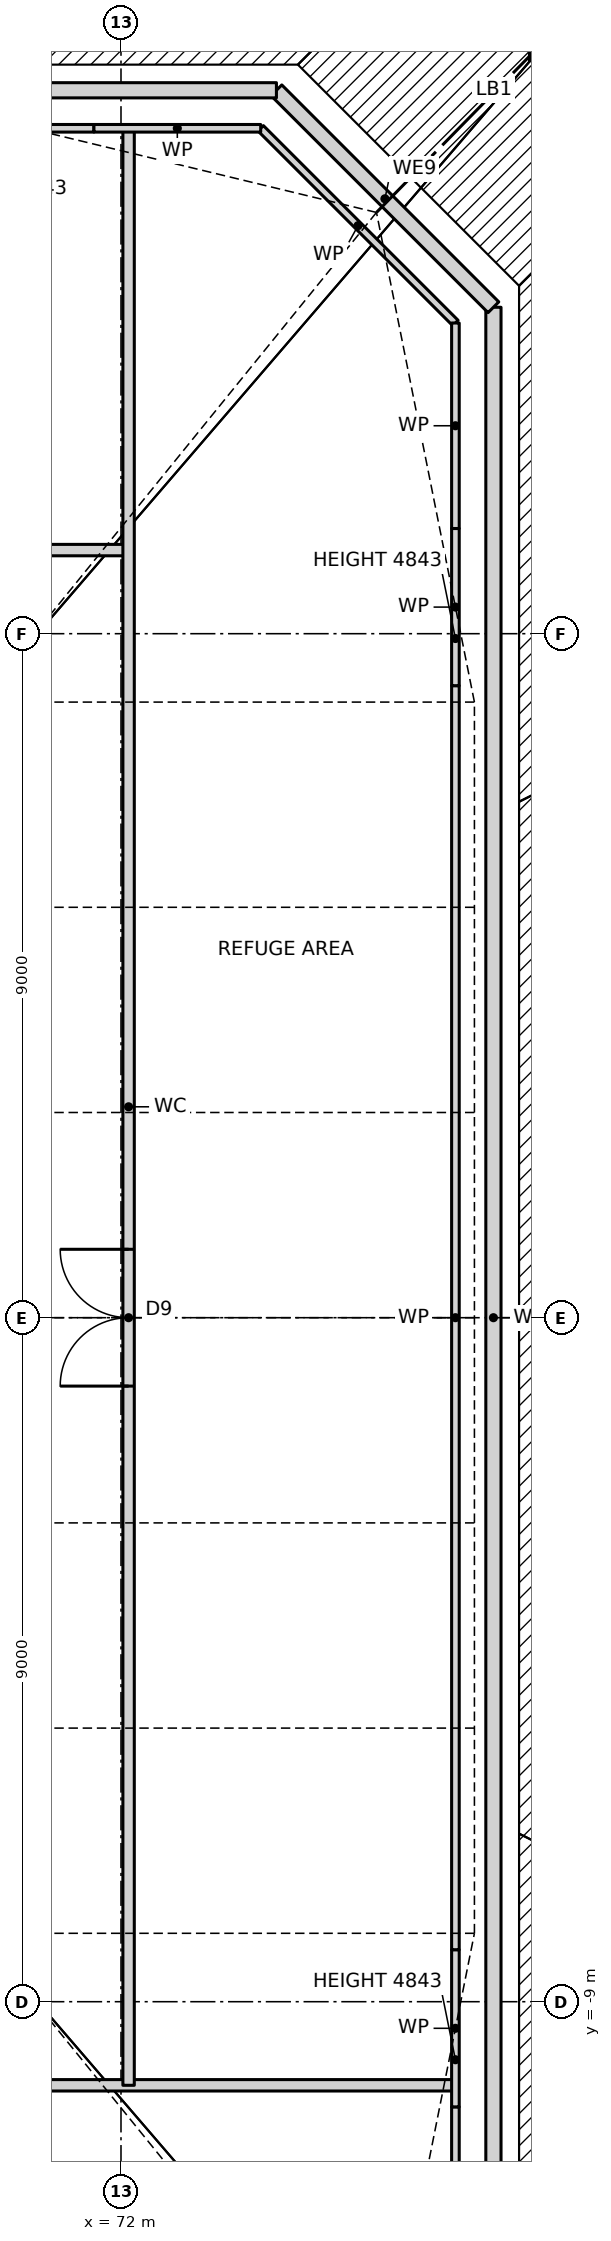
"""IFC4 building model, lengths in metres.
Left out: names, types, materials, properties, quantities, classifications, styles, units other than length and angle.
Written with IfcOpenShell. Run it as: python <this file> out.ifc"""

import sys

from ifc_helpers import new_model, si_unit, direction, frame, frame_2d, origin, origin_2d, place, context, subcontext, project, spatial, rectangle, i_section, extrude, clip, halfspace, element, fill, save


model = new_model("IFC4")
c1 = context("Model", 3, precision=1e-05, world=origin(), true_north=direction((0.0, 1.0)))
c2 = subcontext(c1, "Body", "Model", "MODEL_VIEW")
j1 = project(units=[si_unit("LENGTHUNIT", "METRE"), si_unit("PLANEANGLEUNIT", "RADIAN")], contexts=[c1])
p1 = place(None, origin())
s1 = spatial("IfcSite", under=j1, at=p1, CompositionType="ELEMENT")
p2 = place(p1, origin())
s2 = spatial("IfcBuilding", under=s1, at=p2, CompositionType="ELEMENT")
p3 = place(p2, frame((0.0, 0.0, 74.5)))
s3 = spatial("IfcBuildingStorey", under=s2, at=p3, CompositionType="ELEMENT", Elevation=74.5)
p4 = place(p3, frame((78.9, -9.45, 0.0), z_axis=(-0.343583115532, 0.206127500627, 0.91622164142), x_axis=(-0.514454704863, -0.857517554715, 0.0)))
e1 = element("IfcColumn", 1, at=p4, inside=s3, PredefinedType="COLUMN", context=c2, shape_type="Clipping", body=[
    clip(clip(extrude(i_section(OverallWidth=0.424, OverallDepth=0.475, WebThickness=0.048, FlangeThickness=0.077, at=origin_2d()), origin(), (0.0, 0.0, 1.0), 6.549), halfspace(frame((0.0, 0.0, 0.0), z_axis=(0.0, -0.400671815572, -0.91622164142), x_axis=(-0.514454704863, 0.785676141527, -0.343583115532)), False)), halfspace(frame((0.0, 2.404, 5.497), z_axis=(0.0, 0.400671815572, 0.91622164142), x_axis=(-0.514454704863, 0.785676141527, -0.343583115532)), False)),
])
p5 = place(p3, frame((78.9, -3.15, 0.0), z_axis=(-0.350261033367, 0.070044605522, 0.934029422311), x_axis=(-0.196095673508, -0.980584767795, 0.0)))
e2 = element("IfcColumn", 2, at=p5, inside=s3, PredefinedType="COLUMN", context=c2, shape_type="Clipping", body=[
    clip(clip(extrude(i_section(OverallWidth=0.424, OverallDepth=0.475, WebThickness=0.048, FlangeThickness=0.077, at=origin_2d()), origin(), (0.0, 0.0, 1.0), 6.424), halfspace(frame((0.0, 0.0, 0.0), z_axis=(0.0, -0.357196078167, -0.934029422311), x_axis=(-0.196095673508, 0.91589502419, -0.350261033367)), False)), halfspace(frame((0.0, 2.143, 5.604), z_axis=(0.0, 0.357196078167, 0.934029422311), x_axis=(-0.196095673508, 0.91589502419, -0.350261033367)), False)),
])
p6 = place(p3, frame((78.9, 3.15, 0.0), z_axis=(-0.350261033367, -0.070044605522, 0.934029422311), x_axis=(0.196095673508, -0.980584767795, 0.0)))
e3 = element("IfcColumn", 3, at=p6, inside=s3, PredefinedType="COLUMN", context=c2, shape_type="Clipping", body=[
    clip(clip(extrude(i_section(OverallWidth=0.424, OverallDepth=0.475, WebThickness=0.048, FlangeThickness=0.077, at=origin_2d()), origin(), (0.0, 0.0, 1.0), 6.424), halfspace(frame((0.0, 0.0, 0.0), z_axis=(0.0, -0.357196078167, -0.934029422311), x_axis=(0.196095673508, 0.91589502419, -0.350261033367)), False)), halfspace(frame((0.0, 2.143, 5.604), z_axis=(0.0, 0.357196078167, 0.934029422311), x_axis=(0.196095673508, 0.91589502419, -0.350261033367)), False)),
])
p7 = place(p3, frame((78.9, 9.45, 0.0), z_axis=(-0.343583115532, -0.206127500627, 0.91622164142), x_axis=(0.514454704863, -0.857517554715, 0.0)))
e4 = element("IfcColumn", 4, at=p7, inside=s3, PredefinedType="COLUMN", context=c2, shape_type="Clipping", body=[
    clip(clip(extrude(i_section(OverallWidth=0.424, OverallDepth=0.475, WebThickness=0.048, FlangeThickness=0.077, at=origin_2d()), origin(), (0.0, 0.0, 1.0), 6.549), halfspace(frame((0.0, 0.0, 0.0), z_axis=(0.0, -0.400671815572, -0.91622164142), x_axis=(0.514454704863, 0.785676141527, -0.343583115532)), False)), halfspace(frame((0.0, 2.404, 5.497), z_axis=(0.0, 0.400671815572, 0.91622164142), x_axis=(0.514454704863, 0.785676141527, -0.343583115532)), False)),
])
p8 = place(p3, frame((77.606, 16.797, 0.0), z_axis=(-0.330551321937, -0.331953334069, 0.883483337458), x_axis=(0.708601594959, -0.705608800698, 0.0)))
e5 = element("IfcColumn", 5, at=p8, inside=s3, PredefinedType="COLUMN", context=c2, shape_type="Clipping", body=[
    clip(clip(extrude(i_section(OverallWidth=0.424, OverallDepth=0.475, WebThickness=0.048, FlangeThickness=0.077, at=origin_2d()), origin(), (0.0, 0.0, 1.0), 6.791), halfspace(frame((0.0, 0.0, 0.0), z_axis=(0.0, -0.468462583814, -0.883483337458), x_axis=(0.708601594959, 0.62339361818, -0.330551321937)), False)), halfspace(frame((0.0, 2.811, 5.301), z_axis=(0.0, 0.468462583814, 0.883483337458), x_axis=(0.708601594959, 0.62339361818, -0.330551321937)), False)),
])
p9 = place(p3, frame((71.1, 18.15, 0.0), z_axis=(-0.206163197348, -0.343580475001, 0.916214600002), x_axis=(0.857476506072, -0.514523120505, 0.0)))
e6 = element("IfcColumn", 6, at=p9, inside=s3, PredefinedType="COLUMN", context=c2, shape_type="Clipping", body=[
    clip(clip(extrude(i_section(OverallWidth=0.424, OverallDepth=0.475, WebThickness=0.048, FlangeThickness=0.077, at=origin_2d()), origin(), (0.0, 0.0, 1.0), 6.549), halfspace(frame((0.0, 0.0, 0.0), z_axis=(0.0, -0.400687916891, -0.916214600002), x_axis=(0.857476506072, 0.471413595046, -0.206163197348)), False)), halfspace(frame((0.0, 2.404, 5.497), z_axis=(0.0, 0.400687916891, 0.916214600002), x_axis=(0.857476506072, 0.471413595046, -0.206163197348)), False)),
])
p10 = place(p3, frame((76.9, -13.295, 0.0), z_axis=(0.0, 0.0, 1.0), x_axis=(0.0, 1.0, 0.0)))
e7 = element("IfcWall", 7, at=p10, inside=s3, PredefinedType="PARTITIONING", context=c2, shape_type="SweptSolid", body=[
    extrude(rectangle(XDim=26.59, YDim=0.2, at=frame_2d((13.295, 0.0))), origin(), (0.0, 0.0, 1.0), 5.7),
])
p11 = place(p3, frame((76.9, 13.295, 0.0), z_axis=(0.0, 0.0, 1.0), x_axis=(-0.707106781187, 0.707106781187, 0.0)))
e8 = element("IfcWall", 8, at=p11, inside=s3, PredefinedType="PARTITIONING", context=c2, shape_type="SweptSolid", body=[
    extrude(rectangle(XDim=4.038, YDim=0.2, at=frame_2d((2.019, 0.0))), origin(), (0.0, 0.0, 1.0), 5.7),
])
p12 = place(p3, frame((74.045, 16.15, 0.0), z_axis=(0.0, 0.0, 1.0), x_axis=(-1.0, 0.0, 0.0)))
e9 = element("IfcWall", 9, at=p12, inside=s3, PredefinedType="PARTITIONING", context=c2, shape_type="SweptSolid", body=[
    extrude(rectangle(XDim=22.09, YDim=0.2, at=frame_2d((11.045, 0.0))), origin(), (0.0, 0.0, 1.0), 5.7),
])
p13 = place(p3, frame((53.9, -10.1, 0.0), z_axis=(0.0, 0.0, 1.0), x_axis=(1.0, 0.0, 0.0)))
e10 = element("IfcWall", 10, at=p13, inside=s3, PredefinedType="PARTITIONING", context=c2, shape_type="SweptSolid", body=[
    extrude(rectangle(XDim=22.5, YDim=0.15, at=frame_2d((11.25, 0.0))), origin(), (0.0, 0.0, 1.0), 5.77),
])
p14 = place(p13, frame((3.6, 0.0, 0.0)))
e11 = element("IfcOpeningElement", 11, at=p14, cuts=e10, PredefinedType="OPENING", context=c2, shape_type="SweptSolid", body=[
    extrude(rectangle(XDim=1.8, YDim=2.1, at=frame_2d((0.9, 1.05))), frame((0.0, 0.085, 0.0), z_axis=(0.0, -1.0, 0.0), x_axis=(1.0, 0.0, 0.0)), (0.0, 0.0, 1.0), 0.17),
])
p15 = place(p13, frame((12.7, 0.0, 0.0)))
e12 = element("IfcOpeningElement", 12, at=p15, cuts=e10, PredefinedType="OPENING", context=c2, shape_type="SweptSolid", body=[
    extrude(rectangle(XDim=1.8, YDim=2.1, at=frame_2d((0.9, 1.05))), frame((0.0, 0.085, 0.0), z_axis=(0.0, -1.0, 0.0), x_axis=(1.0, 0.0, 0.0)), (0.0, 0.0, 1.0), 0.17),
])
p16 = place(p3, frame((49.6, 10.1, 0.0), z_axis=(0.0, 0.0, 1.0), x_axis=(1.0, 0.0, 0.0)))
e13 = element("IfcWall", 13, at=p16, inside=s3, PredefinedType="PARTITIONING", context=c2, shape_type="SweptSolid", body=[
    extrude(rectangle(XDim=22.5, YDim=0.15, at=frame_2d((11.25, 0.0))), origin(), (0.0, 0.0, 1.0), 5.77),
])
p17 = place(p16, frame((17.6, 0.0, 0.0)))
e14 = element("IfcOpeningElement", 14, at=p17, cuts=e13, PredefinedType="OPENING", context=c2, shape_type="SweptSolid", body=[
    extrude(rectangle(XDim=1.8, YDim=2.1, at=frame_2d((0.9, 1.05))), frame((0.0, 0.085, 0.0), z_axis=(0.0, -1.0, 0.0), x_axis=(1.0, 0.0, 0.0)), (0.0, 0.0, 1.0), 0.17),
])
p18 = place(p16, frame((8.5, 0.0, 0.0)))
e15 = element("IfcOpeningElement", 15, at=p18, cuts=e13, PredefinedType="OPENING", context=c2, shape_type="SweptSolid", body=[
    extrude(rectangle(XDim=1.8, YDim=2.1, at=frame_2d((0.9, 1.05))), frame((0.0, 0.085, 0.0), z_axis=(0.0, -1.0, 0.0), x_axis=(1.0, 0.0, 0.0)), (0.0, 0.0, 1.0), 0.17),
])
p19 = place(p3, frame((76.4, -13.088, 0.0), z_axis=(0.0, 0.0, 1.0), x_axis=(0.0, 1.0, 0.0)))
e16 = element("IfcWall", 16, at=p19, inside=s3, PredefinedType="PARTITIONING", context=c2, shape_type="SweptSolid", body=[
    extrude(rectangle(XDim=2.704, YDim=0.1, at=frame_2d((1.352, 0.0))), origin(), (0.0, 0.0, 1.0), 5.77),
])
p20 = place(p3, frame((72.1, -10.1, 0.0), z_axis=(0.0, 0.0, 1.0), x_axis=(0.0, 1.0, 0.0)))
e17 = element("IfcWall", 17, at=p20, inside=s3, PredefinedType="PARTITIONING", context=c2, shape_type="SweptSolid", body=[
    extrude(rectangle(XDim=25.75, YDim=0.15, at=frame_2d((12.875, 0.0))), origin(), (0.0, 0.0, 1.0), 5.77),
])
p21 = place(p20, frame((9.2, 0.0, 0.0)))
e18 = element("IfcOpeningElement", 18, at=p21, cuts=e17, PredefinedType="OPENING", context=c2, shape_type="SweptSolid", body=[
    extrude(rectangle(XDim=1.8, YDim=2.1, at=frame_2d((0.9, 1.05))), frame((0.0, 0.085, 0.0), z_axis=(0.0, -1.0, 0.0), x_axis=(1.0, 0.0, 0.0)), (0.0, 0.0, 1.0), 0.17),
])
p22 = place(p3, frame((76.4, 13.088, 0.0), z_axis=(0.0, 0.0, 1.0), x_axis=(-0.707106781187, 0.707106781187, 0.0)))
e19 = element("IfcWall", 19, at=p22, inside=s3, PredefinedType="PARTITIONING", context=c2, shape_type="SweptSolid", body=[
    extrude(rectangle(XDim=3.623, YDim=0.1, at=frame_2d((1.812, 0.0))), origin(), (0.0, 0.0, 1.0), 5.77),
])
p23 = place(p3, frame((69.923, 15.65, 0.0), z_axis=(0.0, 0.0, 1.0), x_axis=(1.0, 0.0, 0.0)))
e20 = element("IfcWall", 20, at=p23, inside=s3, PredefinedType="PARTITIONING", context=c2, shape_type="SweptSolid", body=[
    extrude(rectangle(XDim=1.721, YDim=0.1, at=frame_2d((0.86, 0.0))), origin(), (0.0, 0.0, 1.0), 4.843),
])
p24 = place(p3, frame((71.644, 15.65, 0.0), z_axis=(0.0, 0.0, 1.0), x_axis=(1.0, 0.0, 0.0)))
e21 = element("IfcWall", 21, at=p24, inside=s3, PredefinedType="PARTITIONING", context=c2, shape_type="SweptSolid", body=[
    extrude(rectangle(XDim=2.194, YDim=0.1, at=frame_2d((1.097, 0.0))), origin(), (0.0, 0.0, 1.0), 5.77),
])
p25 = place(p3, frame((76.4, -10.384, 0.0), z_axis=(0.0, 0.0, 1.0), x_axis=(0.0, 1.0, 0.0)))
e22 = element("IfcWall", 22, at=p25, inside=s3, PredefinedType="PARTITIONING", context=c2, shape_type="SweptSolid", body=[
    extrude(rectangle(XDim=2.068, YDim=0.1, at=frame_2d((1.034, 0.0))), origin(), (0.0, 0.0, 1.0), 4.843),
])
p26 = place(p3, frame((76.4, -8.316, 0.0), z_axis=(0.0, 0.0, 1.0), x_axis=(0.0, 1.0, 0.0)))
e23 = element("IfcWall", 23, at=p26, inside=s3, PredefinedType="PARTITIONING", context=c2, shape_type="SweptSolid", body=[
    extrude(rectangle(XDim=16.632, YDim=0.1, at=frame_2d((8.316, 0.0))), origin(), (0.0, 0.0, 1.0), 5.77),
])
p27 = place(p3, frame((76.4, 8.316, 0.0), z_axis=(0.0, 0.0, 1.0), x_axis=(0.0, 1.0, 0.0)))
e24 = element("IfcWall", 24, at=p27, inside=s3, PredefinedType="PARTITIONING", context=c2, shape_type="SweptSolid", body=[
    extrude(rectangle(XDim=2.068, YDim=0.1, at=frame_2d((1.034, 0.0))), origin(), (0.0, 0.0, 1.0), 4.843),
])
p28 = place(p3, frame((76.4, 10.384, 0.0), z_axis=(0.0, 0.0, 1.0), x_axis=(0.0, 1.0, 0.0)))
e25 = element("IfcWall", 25, at=p28, inside=s3, PredefinedType="PARTITIONING", context=c2, shape_type="SweptSolid", body=[
    extrude(rectangle(XDim=2.704, YDim=0.1, at=frame_2d((1.352, 0.0))), origin(), (0.0, 0.0, 1.0), 5.77),
])
p29 = place(p21, origin())
e26 = element("IfcDoor", 26, at=p29, inside=s3, OperationType="DOUBLE_DOOR_SINGLE_SWING", PredefinedType="DOOR", context=c2, shape_type="SweptSolid", body=[
    extrude(rectangle(XDim=1.8, YDim=2.1, at=frame_2d((0.9, 1.05))), frame((0.0, 0.025, 0.0), z_axis=(0.0, -1.0, 0.0), x_axis=(1.0, 0.0, 0.0)), (0.0, 0.0, 1.0), 0.05),
])
fill(e18, e26)
save(model, sys.argv[1])
